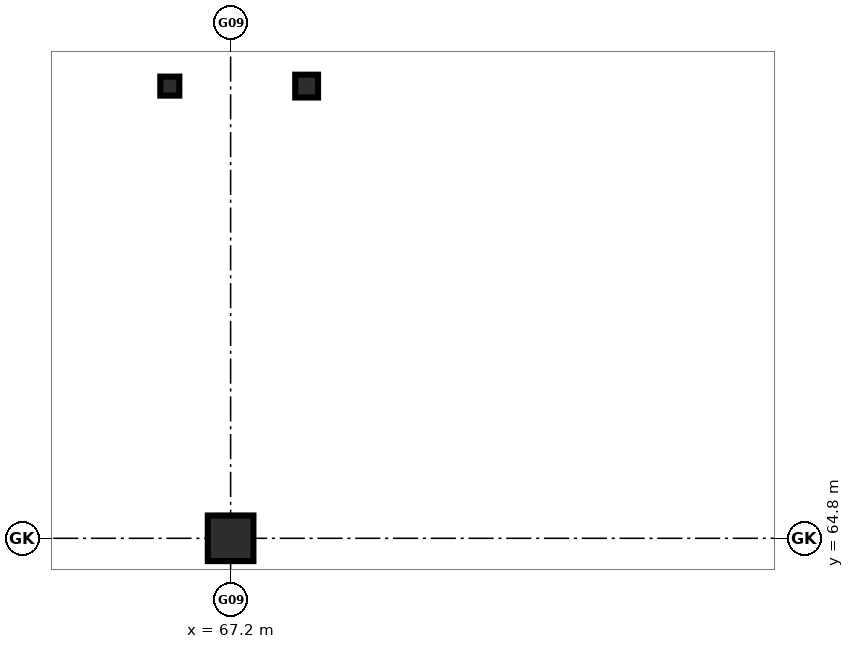
"""IFC4 building model, lengths in metres.
Left out: names, types, materials, properties, quantities, classifications, styles, units other than length and angle.
Written with IfcOpenShell. Run it as: python <this file> out.ifc"""

import sys

from ifc_helpers import new_model, si_unit, direction, frame, origin, origin_2d, place, context, subcontext, project, spatial, rectangle, hollow_rectangle, i_section, extrude, element, save


model = new_model("IFC4")
c1 = context("Model", 3, precision=1e-05, world=origin(), true_north=direction((0.0, 1.0)))
c2 = subcontext(c1, "Body", "Model", "MODEL_VIEW")
j1 = project(units=[si_unit("LENGTHUNIT", "METRE"), si_unit("PLANEANGLEUNIT", "RADIAN")], contexts=[c1])
p1 = place(None, origin())
s1 = spatial("IfcSite", under=j1, at=p1, CompositionType="ELEMENT")
p2 = place(p1, origin())
s2 = spatial("IfcBuilding", under=s1, at=p2, CompositionType="ELEMENT")
p3 = place(p2, frame((0.0, 0.0, -4.8)))
s3 = spatial("IfcBuildingStorey", under=s2, at=p3, CompositionType="ELEMENT", Elevation=-4.8)
p4 = place(p3, frame((67.2, 64.8, 0.0), z_axis=(0.0, 0.0, 1.0), x_axis=(1.0, 0.0, 0.0)))
e1 = element("IfcColumn", 1, at=p4, inside=s3, PredefinedType="COLUMN", context=c2, shape_type="SweptSolid", body=[
    extrude(rectangle(XDim=0.6, YDim=0.6, at=origin_2d()), origin(), (0.0, 0.0, 1.0), 4.8),
])
p5 = place(p3, frame((68.2, 70.75, 0.0), z_axis=(0.0, 0.0, 1.0), x_axis=(1.0, 0.0, 0.0)))
e2 = element("IfcColumn", 2, at=p5, inside=s3, PredefinedType="COLUMN", context=c2, shape_type="SweptSolid", body=[
    extrude(i_section(OverallWidth=0.3, OverallDepth=0.3, WebThickness=0.011, FlangeThickness=0.019, FilletRadius=0.027, at=origin_2d()), origin(), (0.0, 0.0, 1.0), 4.8),
])
p6 = place(p3, frame((66.4, 70.75, 0.0), z_axis=(0.0, 0.0, 1.0), x_axis=(1.0, 0.0, 0.0)))
e3 = element("IfcColumn", 3, at=p6, inside=s3, PredefinedType="COLUMN", context=c2, shape_type="SweptSolid", body=[
    extrude(hollow_rectangle(XDim=0.25, YDim=0.25, WallThickness=0.01, at=origin_2d()), origin(), (0.0, 0.0, 1.0), 4.8),
])
save(model, sys.argv[1])
